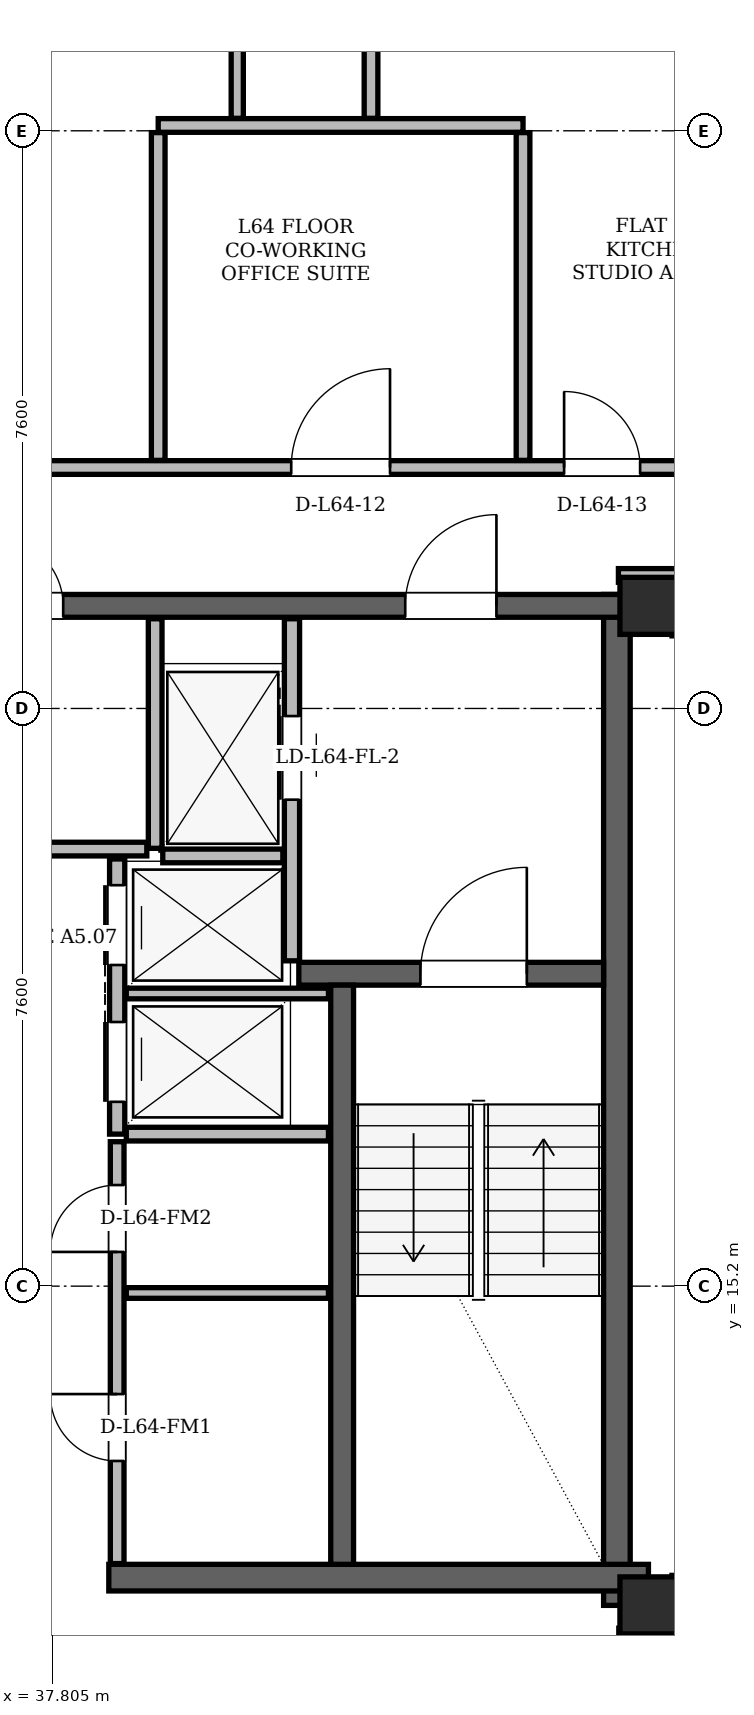
"""IFC4 building model, lengths in metres.
Left out: names, types, materials, properties, quantities, classifications, styles, units other than length and angle.
Written with IfcOpenShell. Run it as: python <this file> out.ifc"""

import sys

from ifc_helpers import new_model, si_unit, direction, frame, frame_2d, origin, origin_2d, place, context, subcontext, project, spatial, rectangle, hollow_rectangle, extrude, element, fill, save


model = new_model("IFC4")
c1 = context("Model", 3, precision=1e-05, world=origin(), true_north=direction((0.0, 1.0)))
c2 = subcontext(c1, "Body", "Model", "MODEL_VIEW")
j1 = project(units=[si_unit("LENGTHUNIT", "METRE"), si_unit("PLANEANGLEUNIT", "RADIAN")], contexts=[c1])
p1 = place(None, origin())
s1 = spatial("IfcSite", under=j1, at=p1, CompositionType="ELEMENT")
p2 = place(p1, origin())
s2 = spatial("IfcBuilding", under=s1, at=p2, CompositionType="ELEMENT")
p3 = place(p2, frame((0.0, 0.0, 241.5)))
s3 = spatial("IfcBuildingStorey", under=s2, at=p3, CompositionType="ELEMENT", Elevation=241.5)
for number, where, z_axis, x_axis in (
    (1, (45.65, 11.0, 0.0), (0.0, 0.0, 1.0), (1.0, 0.0, 0.0)),
    (2, (45.65, 24.15, 0.0), (0.0, 0.0, 1.0), (1.0, 0.0, 0.0)),
):
    element("IfcColumn", number, at=place(p3, frame(where, z_axis=z_axis, x_axis=x_axis)), inside=s3, PredefinedType="COLUMN", context=c2, shape_type="SweptSolid", body=[
        extrude(hollow_rectangle(XDim=0.75, YDim=0.75, WallThickness=0.06, at=origin_2d()), origin(), (0.0, 0.0, 1.0), 3.6),
    ])
p4 = place(p3, frame((45.235, 11.0, 0.0), z_axis=(0.0, 0.0, 1.0), x_axis=(0.0, 1.0, 0.0)))
e3 = element("IfcWall", 3, at=p4, inside=s3, PredefinedType="SHEAR", context=c2, shape_type="SweptSolid", body=[
    extrude(rectangle(XDim=13.3, YDim=0.35, at=frame_2d((6.65, 0.0))), origin(), (0.0, 0.0, 1.0), 3.34),
])
p5 = place(p3, frame((38.55, 11.365, 0.0), z_axis=(0.0, 0.0, 1.0), x_axis=(1.0, 0.0, 0.0)))
e4 = element("IfcWall", 4, at=p5, inside=s3, PredefinedType="SHEAR", context=c2, shape_type="SweptSolid", body=[
    extrude(rectangle(XDim=7.1, YDim=0.35, at=frame_2d((3.55, 0.0))), origin(), (0.0, 0.0, 1.0), 3.34),
])
p6 = place(p3, frame((29.65, 24.15, 0.0), z_axis=(0.0, 0.0, 1.0), x_axis=(1.0, 0.0, 0.0)))
e5 = element("IfcWall", 5, at=p6, inside=s3, PredefinedType="SHEAR", context=c2, shape_type="SweptSolid", body=[
    extrude(rectangle(XDim=15.7, YDim=0.3, at=frame_2d((7.85, 0.0))), origin(), (0.0, 0.0, 1.0), 3.34),
])
p7 = place(p6, frame((1.7, 0.0, 0.0)))
e6 = element("IfcOpeningElement", 6, at=p7, cuts=e5, PredefinedType="OPENING", context=c2, shape_type="SweptSolid", body=[
    extrude(rectangle(XDim=1.2, YDim=2.2, at=frame_2d((0.6, 1.1))), frame((0.0, 0.15, 0.0), z_axis=(0.0, -1.0, 0.0), x_axis=(1.0, 0.0, 0.0)), (0.0, 0.0, 1.0), 0.3),
])
p8 = place(p6, frame((12.8, 0.0, 0.0)))
e7 = element("IfcOpeningElement", 7, at=p8, cuts=e5, PredefinedType="OPENING", context=c2, shape_type="SweptSolid", body=[
    extrude(rectangle(XDim=1.2, YDim=2.2, at=frame_2d((0.6, 1.1))), frame((0.0, 0.15, 0.0), z_axis=(0.0, -1.0, 0.0), x_axis=(1.0, 0.0, 0.0)), (0.0, 0.0, 1.0), 0.3),
])
p9 = place(p6, frame((7.4, 0.0, 0.0)))
e8 = element("IfcOpeningElement", 8, at=p9, cuts=e5, PredefinedType="OPENING", context=c2, shape_type="SweptSolid", body=[
    extrude(rectangle(XDim=0.9, YDim=2.05, at=frame_2d((0.45, 1.025))), frame((0.0, 0.15, 0.0), z_axis=(0.0, -1.0, 0.0), x_axis=(1.0, 0.0, 0.0)), (0.0, 0.0, 1.0), 0.3),
])
p10 = place(p3, frame((41.05, 19.31, 0.0), z_axis=(0.0, 0.0, 1.0), x_axis=(1.0, 0.0, 0.0)))
e9 = element("IfcWall", 9, at=p10, inside=s3, PredefinedType="SHEAR", context=c2, shape_type="SweptSolid", body=[
    extrude(rectangle(XDim=4.01, YDim=0.3, at=frame_2d((2.005, 0.0))), origin(), (0.0, 0.0, 1.0), 3.34),
])
p11 = place(p10, frame((1.6, 0.0, 0.0)))
e10 = element("IfcOpeningElement", 10, at=p11, cuts=e9, PredefinedType="OPENING", context=c2, shape_type="SweptSolid", body=[
    extrude(rectangle(XDim=1.4, YDim=2.2, at=frame_2d((0.7, 1.1))), frame((0.0, 0.15, 0.0), z_axis=(0.0, -1.0, 0.0), x_axis=(1.0, 0.0, 0.0)), (0.0, 0.0, 1.0), 0.3),
])
p12 = place(p3, frame((41.62, 11.54, 0.0), z_axis=(0.0, 0.0, 1.0), x_axis=(0.0, 1.0, 0.0)))
e11 = element("IfcWall", 11, at=p12, inside=s3, PredefinedType="SHEAR", context=c2, shape_type="SweptSolid", body=[
    extrude(rectangle(XDim=7.62, YDim=0.3, at=frame_2d((3.81, 0.0))), origin(), (0.0, 0.0, 1.0), 3.34),
])
p13 = place(p3, frame((58.857, 11.097, 0.0), z_axis=(0.0, 0.0, 1.0), x_axis=(-0.499999075663, 0.86602593745, 0.0)))
e12 = element("IfcWall", 12, at=p13, inside=s3, PredefinedType="SOLIDWALL", context=c2, shape_type="SweptSolid", body=[
    extrude(rectangle(XDim=36.951, YDim=0.29, at=frame_2d((18.476, 0.0))), origin(), (0.0, 0.0, 1.0), 2.637),
])
p14 = place(p13, frame((7.615, 0.0, 0.0)))
e13 = element("IfcOpeningElement", 13, at=p14, cuts=e12, PredefinedType="OPENING", context=c2, shape_type="SweptSolid", body=[
    extrude(rectangle(XDim=1.5, YDim=2.2, at=frame_2d((0.75, 1.1))), frame((0.0, 0.145, 0.0), z_axis=(0.0, -1.0, 0.0), x_axis=(1.0, 0.0, 0.0)), (0.0, 0.0, 1.0), 0.29),
])
p15 = place(p13, frame((28.662, 0.0, 0.0)))
e14 = element("IfcOpeningElement", 14, at=p15, cuts=e12, PredefinedType="OPENING", context=c2, shape_type="SweptSolid", body=[
    extrude(rectangle(XDim=1.5, YDim=2.2, at=frame_2d((0.75, 1.1))), frame((0.0, 0.145, 0.0), z_axis=(0.0, -1.0, 0.0), x_axis=(1.0, 0.0, 0.0)), (0.0, 0.0, 1.0), 0.29),
])
p16 = place(p13, frame((3.768, 0.0, 0.85)))
e15 = element("IfcOpeningElement", 15, at=p16, cuts=e12, PredefinedType="OPENING", context=c2, shape_type="SweptSolid", body=[
    extrude(rectangle(XDim=1.2, YDim=1.48, at=frame_2d((0.6, 0.74))), frame((0.0, 0.145, 0.0), z_axis=(0.0, -1.0, 0.0), x_axis=(1.0, 0.0, 0.0)), (0.0, 0.0, 1.0), 0.29),
])
p17 = place(p13, frame((1.122, 0.0, 0.85)))
e16 = element("IfcOpeningElement", 16, at=p17, cuts=e12, PredefinedType="OPENING", context=c2, shape_type="SweptSolid", body=[
    extrude(rectangle(XDim=1.6, YDim=1.677, at=frame_2d((0.8, 0.838))), frame((0.0, 0.145, 0.0), z_axis=(0.0, -1.0, 0.0), x_axis=(1.0, 0.0, 0.0)), (0.0, 0.0, 1.0), 0.29),
])
p18 = place(p13, frame((34.681, 0.0, 0.85)))
e17 = element("IfcOpeningElement", 17, at=p18, cuts=e12, PredefinedType="OPENING", context=c2, shape_type="SweptSolid", body=[
    extrude(rectangle(XDim=1.2, YDim=1.48, at=frame_2d((0.6, 0.74))), frame((0.0, 0.145, 0.0), z_axis=(0.0, -1.0, 0.0), x_axis=(1.0, 0.0, 0.0)), (0.0, 0.0, 1.0), 0.29),
])
p19 = place(p13, frame((16.81, 0.0, 0.85)))
e18 = element("IfcOpeningElement", 18, at=p19, cuts=e12, PredefinedType="OPENING", context=c2, shape_type="SweptSolid", body=[
    extrude(rectangle(XDim=2.2, YDim=1.677, at=frame_2d((1.1, 0.838))), frame((0.0, 0.145, 0.0), z_axis=(0.0, -1.0, 0.0), x_axis=(1.0, 0.0, 0.0)), (0.0, 0.0, 1.0), 0.29),
])
p20 = place(p13, frame((22.803, 0.0, 0.85)))
e19 = element("IfcOpeningElement", 19, at=p20, cuts=e12, PredefinedType="OPENING", context=c2, shape_type="SweptSolid", body=[
    extrude(rectangle(XDim=1.6, YDim=1.677, at=frame_2d((0.8, 0.838))), frame((0.0, 0.145, 0.0), z_axis=(0.0, -1.0, 0.0), x_axis=(1.0, 0.0, 0.0)), (0.0, 0.0, 1.0), 0.29),
])
p21 = place(p13, frame((9.478, 0.0, 0.85)))
e20 = element("IfcOpeningElement", 20, at=p21, cuts=e12, PredefinedType="OPENING", context=c2, shape_type="SweptSolid", body=[
    extrude(rectangle(XDim=1.2, YDim=1.48, at=frame_2d((0.6, 0.74))), frame((0.0, 0.145, 0.0), z_axis=(0.0, -1.0, 0.0), x_axis=(1.0, 0.0, 0.0)), (0.0, 0.0, 1.0), 0.29),
])
p22 = place(p3, frame((40.96, 19.48, 0.0), z_axis=(0.0, 0.0, 1.0), x_axis=(0.0, 1.0, 0.0)))
e21 = element("IfcWall", 21, at=p22, inside=s3, PredefinedType="PARTITIONING", context=c2, shape_type="SweptSolid", body=[
    extrude(rectangle(XDim=4.5, YDim=0.2, at=frame_2d((2.25, 0.0))), origin(), (0.0, 0.0, 1.0), 3.34),
])
p23 = place(p22, frame((2.12, 0.0, 0.0)))
e22 = element("IfcOpeningElement", 22, at=p23, cuts=e21, PredefinedType="OPENING", context=c2, shape_type="SweptSolid", body=[
    extrude(rectangle(XDim=1.1, YDim=2.2, at=frame_2d((0.55, 1.1))), frame((0.0, 0.1, 0.0), z_axis=(0.0, -1.0, 0.0), x_axis=(1.0, 0.0, 0.0)), (0.0, 0.0, 1.0), 0.2),
])
p24 = place(p3, frame((39.16, 20.96, 0.0), z_axis=(0.0, 0.0, 1.0), x_axis=(0.0, 1.0, 0.0)))
e23 = element("IfcWall", 23, at=p24, inside=s3, PredefinedType="PARTITIONING", context=c2, shape_type="SweptSolid", body=[
    extrude(rectangle(XDim=3.02, YDim=0.18, at=frame_2d((1.51, 0.0))), origin(), (0.0, 0.0, 1.0), 3.34),
])
p25 = place(p3, frame((39.26, 20.86, 0.0), z_axis=(0.0, 0.0, 1.0), x_axis=(1.0, 0.0, 0.0)))
e24 = element("IfcWall", 24, at=p25, inside=s3, PredefinedType="PARTITIONING", context=c2, shape_type="SweptSolid", body=[
    extrude(rectangle(XDim=1.58, YDim=0.18, at=frame_2d((0.79, 0.0))), origin(), (0.0, 0.0, 1.0), 3.34),
])
p26 = place(p3, frame((38.66, 17.2, 0.0), z_axis=(0.0, 0.0, 1.0), x_axis=(0.0, 1.0, 0.0)))
e25 = element("IfcWall", 25, at=p26, inside=s3, PredefinedType="PARTITIONING", context=c2, shape_type="SweptSolid", body=[
    extrude(rectangle(XDim=3.62, YDim=0.2, at=frame_2d((1.81, 0.0))), origin(), (0.0, 0.0, 1.0), 3.34),
])
p27 = place(p26, frame((0.425, 0.0, 0.0)))
e26 = element("IfcOpeningElement", 26, at=p27, cuts=e25, PredefinedType="OPENING", context=c2, shape_type="SweptSolid", body=[
    extrude(rectangle(XDim=1.05, YDim=2.15, at=frame_2d((0.525, 1.075))), frame((0.0, 0.1, 0.0), z_axis=(0.0, -1.0, 0.0), x_axis=(1.0, 0.0, 0.0)), (0.0, 0.0, 1.0), 0.2),
])
p28 = place(p26, frame((2.225, 0.0, 0.0)))
e27 = element("IfcOpeningElement", 27, at=p28, cuts=e25, PredefinedType="OPENING", context=c2, shape_type="SweptSolid", body=[
    extrude(rectangle(XDim=1.05, YDim=2.15, at=frame_2d((0.525, 1.075))), frame((0.0, 0.1, 0.0), z_axis=(0.0, -1.0, 0.0), x_axis=(1.0, 0.0, 0.0)), (0.0, 0.0, 1.0), 0.2),
])
p29 = place(p3, frame((38.78, 17.2, 0.0), z_axis=(0.0, 0.0, 1.0), x_axis=(1.0, 0.0, 0.0)))
e28 = element("IfcWall", 28, at=p29, inside=s3, PredefinedType="PARTITIONING", context=c2, shape_type="SweptSolid", body=[
    extrude(rectangle(XDim=2.66, YDim=0.18, at=frame_2d((1.33, 0.0))), origin(), (0.0, 0.0, 1.0), 3.34),
])
p30 = place(p3, frame((38.78, 19.05, 0.0), z_axis=(0.0, 0.0, 1.0), x_axis=(1.0, 0.0, 0.0)))
e29 = element("IfcWall", 29, at=p30, inside=s3, PredefinedType="PARTITIONING", context=c2, shape_type="SweptSolid", body=[
    extrude(rectangle(XDim=2.66, YDim=0.14, at=frame_2d((1.33, 0.0))), origin(), (0.0, 0.0, 1.0), 3.34),
])
p31 = place(p3, frame((38.66, 11.55, 0.0), z_axis=(0.0, 0.0, 1.0), x_axis=(0.0, 1.0, 0.0)))
e30 = element("IfcWall", 30, at=p31, inside=s3, PredefinedType="PARTITIONING", context=c2, shape_type="SweptSolid", body=[
    extrude(rectangle(XDim=5.55, YDim=0.18, at=frame_2d((2.775, 0.0))), origin(), (0.0, 0.0, 1.0), 3.34),
])
p32 = place(p31, frame((1.35, 0.0, 0.0)))
e31 = element("IfcOpeningElement", 31, at=p32, cuts=e30, PredefinedType="OPENING", context=c2, shape_type="SweptSolid", body=[
    extrude(rectangle(XDim=0.88, YDim=2.08, at=frame_2d((0.44, 1.04))), frame((0.0, 0.09, 0.0), z_axis=(0.0, -1.0, 0.0), x_axis=(1.0, 0.0, 0.0)), (0.0, 0.0, 1.0), 0.18),
])
p33 = place(p31, frame((4.1, 0.0, 0.0)))
e32 = element("IfcOpeningElement", 32, at=p33, cuts=e30, PredefinedType="OPENING", context=c2, shape_type="SweptSolid", body=[
    extrude(rectangle(XDim=0.88, YDim=2.08, at=frame_2d((0.44, 1.04))), frame((0.0, 0.09, 0.0), z_axis=(0.0, -1.0, 0.0), x_axis=(1.0, 0.0, 0.0)), (0.0, 0.0, 1.0), 0.18),
])
p34 = place(p3, frame((38.78, 15.11, 0.0), z_axis=(0.0, 0.0, 1.0), x_axis=(1.0, 0.0, 0.0)))
e33 = element("IfcWall", 33, at=p34, inside=s3, PredefinedType="PARTITIONING", context=c2, shape_type="SweptSolid", body=[
    extrude(rectangle(XDim=2.66, YDim=0.14, at=frame_2d((1.33, 0.0))), origin(), (0.0, 0.0, 1.0), 3.34),
])
p35 = place(p3, frame((35.95, 20.95, 0.0), z_axis=(0.0, 0.0, 1.0), x_axis=(1.0, 0.0, 0.0)))
e34 = element("IfcWall", 34, at=p35, inside=s3, PredefinedType="PARTITIONING", context=c2, shape_type="SweptSolid", body=[
    extrude(rectangle(XDim=3.1, YDim=0.18, at=frame_2d((1.55, 0.0))), origin(), (0.0, 0.0, 1.0), 3.34),
])
p36 = place(p3, frame((45.26, 10.61, 0.0), z_axis=(0.0, 0.0, 1.0), x_axis=(1.0, 0.0, 0.0)))
e35 = element("IfcWall", 35, at=p36, inside=s3, PredefinedType="PARTITIONING", context=c2, shape_type="SweptSolid", body=[
    extrude(rectangle(XDim=0.78, YDim=0.18, at=frame_2d((0.39, 0.0))), origin(), (0.0, 0.0, 1.0), 3.34),
])
p37 = place(p3, frame((45.255, 24.55, 0.0), z_axis=(0.0, 0.0, 1.0), x_axis=(1.0, 0.0, 0.0)))
e36 = element("IfcWall", 36, at=p37, inside=s3, PredefinedType="PARTITIONING", context=c2, shape_type="SweptSolid", body=[
    extrude(rectangle(XDim=0.79, YDim=0.18, at=frame_2d((0.395, 0.0))), origin(), (0.0, 0.0, 1.0), 2.873),
])
p38 = place(p3, frame((25.6, 25.97, 0.0), z_axis=(0.0, 0.0, 1.0), x_axis=(1.0, 0.0, 0.0)))
e37 = element("IfcWall", 37, at=p38, inside=s3, PredefinedType="PARTITIONING", context=c2, shape_type="SweptSolid", body=[
    extrude(rectangle(XDim=21.85, YDim=0.18, at=frame_2d((10.925, 0.0))), origin(), (0.0, 0.0, 1.0), 2.873),
])
p39 = place(p38, frame((3.87, 0.0, 0.0)))
e38 = element("IfcOpeningElement", 38, at=p39, cuts=e37, PredefinedType="OPENING", context=c2, shape_type="SweptSolid", body=[
    extrude(rectangle(XDim=1.0, YDim=2.18, at=frame_2d((0.5, 1.09))), frame((0.0, 0.09, 0.0), z_axis=(0.0, -1.0, 0.0), x_axis=(1.0, 0.0, 0.0)), (0.0, 0.0, 1.0), 0.18),
])
p40 = place(p38, frame((9.833, 0.0, 0.0)))
e39 = element("IfcOpeningElement", 39, at=p40, cuts=e37, PredefinedType="OPENING", context=c2, shape_type="SweptSolid", body=[
    extrude(rectangle(XDim=1.0, YDim=2.18, at=frame_2d((0.5, 1.09))), frame((0.0, 0.09, 0.0), z_axis=(0.0, -1.0, 0.0), x_axis=(1.0, 0.0, 0.0)), (0.0, 0.0, 1.0), 0.18),
])
p41 = place(p38, frame((15.35, 0.0, 0.0)))
e40 = element("IfcOpeningElement", 40, at=p41, cuts=e37, PredefinedType="OPENING", context=c2, shape_type="SweptSolid", body=[
    extrude(rectangle(XDim=1.3, YDim=2.2, at=frame_2d((0.65, 1.1))), frame((0.0, 0.09, 0.0), z_axis=(0.0, -1.0, 0.0), x_axis=(1.0, 0.0, 0.0)), (0.0, 0.0, 1.0), 0.18),
])
p42 = place(p38, frame((18.94, 0.0, 0.0)))
e41 = element("IfcOpeningElement", 41, at=p42, cuts=e37, PredefinedType="OPENING", context=c2, shape_type="SweptSolid", body=[
    extrude(rectangle(XDim=1.0, YDim=2.18, at=frame_2d((0.5, 1.09))), frame((0.0, 0.09, 0.0), z_axis=(0.0, -1.0, 0.0), x_axis=(1.0, 0.0, 0.0)), (0.0, 0.0, 1.0), 0.18),
])
p43 = place(p3, frame((39.2, 30.47, 0.0), z_axis=(0.0, 0.0, 1.0), x_axis=(1.0, 0.0, 0.0)))
e42 = element("IfcWall", 42, at=p43, inside=s3, PredefinedType="PARTITIONING", context=c2, shape_type="SweptSolid", body=[
    extrude(rectangle(XDim=4.8, YDim=0.18, at=frame_2d((2.4, 0.0))), origin(), (0.0, 0.0, 1.0), 2.873),
])
p44 = place(p3, frame((39.2, 26.064, 0.0), z_axis=(0.0, 0.0, 1.0), x_axis=(0.0, 1.0, 0.0)))
e43 = element("IfcWall", 43, at=p44, inside=s3, PredefinedType="PARTITIONING", context=c2, shape_type="SweptSolid", body=[
    extrude(rectangle(XDim=4.312, YDim=0.18, at=frame_2d((2.156, 0.0))), origin(), (0.0, 0.0, 1.0), 3.34),
])
p45 = place(p3, frame((40.24, 30.564, 0.0), z_axis=(0.0, 0.0, 1.0), x_axis=(0.0, 1.0, 0.0)))
e44 = element("IfcWall", 44, at=p45, inside=s3, PredefinedType="PARTITIONING", context=c2, shape_type="SweptSolid", body=[
    extrude(rectangle(XDim=12.164, YDim=0.16, at=frame_2d((6.082, 0.0))), origin(), (0.0, 0.0, 1.0), 3.34),
])
p46 = place(p45, frame((5.705, 0.0, 0.0)))
e45 = element("IfcOpeningElement", 45, at=p46, cuts=e44, PredefinedType="OPENING", context=c2, shape_type="SweptSolid", body=[
    extrude(rectangle(XDim=0.88, YDim=2.08, at=frame_2d((0.44, 1.04))), frame((0.0, 0.08, 0.0), z_axis=(0.0, -1.0, 0.0), x_axis=(1.0, 0.0, 0.0)), (0.0, 0.0, 1.0), 0.16),
])
p47 = place(p3, frame((42.0, 30.564, 0.0), z_axis=(0.0, 0.0, 1.0), x_axis=(0.0, 1.0, 0.0)))
e46 = element("IfcWall", 46, at=p47, inside=s3, PredefinedType="PARTITIONING", context=c2, shape_type="SweptSolid", body=[
    extrude(rectangle(XDim=9.433, YDim=0.18, at=frame_2d((4.716, 0.0))), origin(), (0.0, 0.0, 1.0), 2.873),
])
p48 = place(p3, frame((44.0, 26.064, 0.0), z_axis=(0.0, 0.0, 1.0), x_axis=(0.0, 1.0, 0.0)))
e47 = element("IfcWall", 47, at=p48, inside=s3, PredefinedType="PARTITIONING", context=c2, shape_type="SweptSolid", body=[
    extrude(rectangle(XDim=4.312, YDim=0.18, at=frame_2d((2.156, 0.0))), origin(), (0.0, 0.0, 1.0), 2.873),
])
p49 = place(p3, frame((46.05, 10.95, 0.0), z_axis=(0.0, 0.0, 1.0), x_axis=(0.0, 1.0, 0.0)))
e48 = element("IfcWall", 48, at=p49, inside=s3, PredefinedType="PARTITIONING", context=c2, shape_type="SweptSolid", body=[
    extrude(rectangle(XDim=0.445, YDim=0.18, at=frame_2d((0.223, 0.0))), origin(), (0.0, 0.0, 1.0), 2.873),
])
p50 = place(p3, frame((46.05, 23.755, 0.0), z_axis=(0.0, 0.0, 1.0), x_axis=(0.0, 1.0, 0.0)))
e49 = element("IfcWall", 49, at=p50, inside=s3, PredefinedType="PARTITIONING", context=c2, shape_type="SweptSolid", body=[
    extrude(rectangle(XDim=0.565, YDim=0.18, at=frame_2d((0.283, 0.0))), origin(), (0.0, 0.0, 1.0), 3.34),
])
p51 = place(p32, origin())
e50 = element("IfcDoor", 50, at=p51, inside=s3, OperationType="SINGLE_SWING_RIGHT", PredefinedType="DOOR", context=c2, shape_type="SweptSolid", body=[
    extrude(rectangle(XDim=0.88, YDim=2.08, at=frame_2d((0.44, 1.04))), frame((0.0, 0.025, 0.0), z_axis=(0.0, -1.0, 0.0), x_axis=(1.0, 0.0, 0.0)), (0.0, 0.0, 1.0), 0.05),
])
fill(e31, e50)
p52 = place(p33, origin())
e51 = element("IfcDoor", 51, at=p52, inside=s3, OperationType="SINGLE_SWING_LEFT", PredefinedType="DOOR", context=c2, shape_type="SweptSolid", body=[
    extrude(rectangle(XDim=0.88, YDim=2.08, at=frame_2d((0.44, 1.04))), frame((0.0, 0.025, 0.0), z_axis=(0.0, -1.0, 0.0), x_axis=(1.0, 0.0, 0.0)), (0.0, 0.0, 1.0), 0.05),
])
fill(e32, e51)
p53 = place(p23, origin())
e52 = element("IfcDoor", 52, at=p53, inside=s3, OperationType="SLIDING_TO_RIGHT", PredefinedType="DOOR", context=c2, shape_type="SweptSolid", body=[
    extrude(rectangle(XDim=1.1, YDim=2.2, at=frame_2d((0.55, 1.1))), frame((0.0, 0.025, 0.0), z_axis=(0.0, -1.0, 0.0), x_axis=(1.0, 0.0, 0.0)), (0.0, 0.0, 1.0), 0.05),
])
fill(e22, e52)
p54 = place(p27, origin())
e53 = element("IfcDoor", 53, at=p54, inside=s3, OperationType="SLIDING_TO_RIGHT", PredefinedType="DOOR", context=c2, shape_type="SweptSolid", body=[
    extrude(rectangle(XDim=1.05, YDim=2.15, at=frame_2d((0.525, 1.075))), frame((0.0, 0.025, 0.0), z_axis=(0.0, -1.0, 0.0), x_axis=(1.0, 0.0, 0.0)), (0.0, 0.0, 1.0), 0.05),
])
fill(e26, e53)
p55 = place(p28, origin())
e54 = element("IfcDoor", 54, at=p55, inside=s3, OperationType="SLIDING_TO_LEFT", PredefinedType="DOOR", context=c2, shape_type="SweptSolid", body=[
    extrude(rectangle(XDim=1.05, YDim=2.15, at=frame_2d((0.525, 1.075))), frame((0.0, 0.025, 0.0), z_axis=(0.0, -1.0, 0.0), x_axis=(1.0, 0.0, 0.0)), (0.0, 0.0, 1.0), 0.05),
])
fill(e27, e54)
p56 = place(p11, origin())
e55 = element("IfcDoor", 55, at=p56, inside=s3, OperationType="SINGLE_SWING_RIGHT", PredefinedType="DOOR", context=c2, shape_type="SweptSolid", body=[
    extrude(rectangle(XDim=1.4, YDim=2.2, at=frame_2d((0.7, 1.1))), frame((0.0, 0.025, 0.0), z_axis=(0.0, -1.0, 0.0), x_axis=(1.0, 0.0, 0.0)), (0.0, 0.0, 1.0), 0.05),
])
fill(e10, e55)
p57 = place(p8, origin())
e56 = element("IfcDoor", 56, at=p57, inside=s3, OperationType="SINGLE_SWING_RIGHT", PredefinedType="DOOR", context=c2, shape_type="SweptSolid", body=[
    extrude(rectangle(XDim=1.2, YDim=2.2, at=frame_2d((0.6, 1.1))), frame((0.0, 0.025, 0.0), z_axis=(0.0, -1.0, 0.0), x_axis=(1.0, 0.0, 0.0)), (0.0, 0.0, 1.0), 0.05),
])
fill(e7, e56)
p58 = place(p9, origin())
e57 = element("IfcDoor", 57, at=p58, inside=s3, OperationType="SINGLE_SWING_LEFT", PredefinedType="DOOR", context=c2, shape_type="SweptSolid", body=[
    extrude(rectangle(XDim=0.9, YDim=2.05, at=frame_2d((0.45, 1.025))), frame((0.0, 0.025, 0.0), z_axis=(0.0, -1.0, 0.0), x_axis=(1.0, 0.0, 0.0)), (0.0, 0.0, 1.0), 0.05),
])
fill(e8, e57)
p59 = place(p41, origin())
e58 = element("IfcDoor", 58, at=p59, inside=s3, OperationType="SINGLE_SWING_RIGHT", PredefinedType="DOOR", context=c2, shape_type="SweptSolid", body=[
    extrude(rectangle(XDim=1.3, YDim=2.2, at=frame_2d((0.65, 1.1))), frame((0.0, 0.025, 0.0), z_axis=(0.0, -1.0, 0.0), x_axis=(1.0, 0.0, 0.0)), (0.0, 0.0, 1.0), 0.05),
])
fill(e40, e58)
p60 = place(p42, origin())
e59 = element("IfcDoor", 59, at=p60, inside=s3, OperationType="SINGLE_SWING_LEFT", PredefinedType="DOOR", context=c2, shape_type="SweptSolid", body=[
    extrude(rectangle(XDim=1.0, YDim=2.18, at=frame_2d((0.5, 1.09))), frame((0.0, 0.025, 0.0), z_axis=(0.0, -1.0, 0.0), x_axis=(1.0, 0.0, 0.0)), (0.0, 0.0, 1.0), 0.05),
])
fill(e41, e59)
save(model, sys.argv[1])
